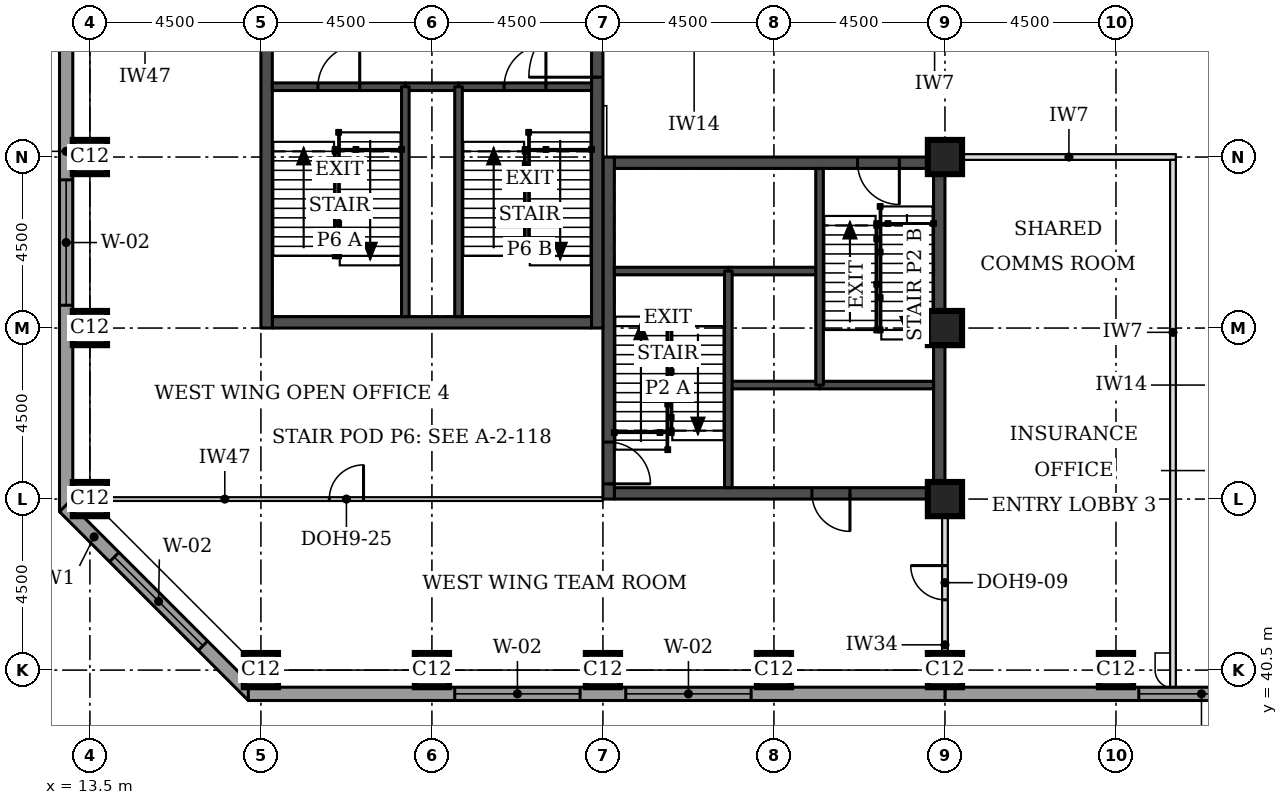
"""IFC4 building model, lengths in metres.
Left out: names, types, materials, properties, quantities, classifications, styles, units other than length and angle.
Written with IfcOpenShell. Run it as: python <this file> out.ifc"""

import sys

from ifc_helpers import new_model, si_unit, direction, frame, frame_2d, origin, origin_2d, place, context, subcontext, project, spatial, rectangle, extrude, element, fill, save


model = new_model("IFC4")
c1 = context("Model", 3, precision=1e-05, world=origin(), true_north=direction((0.0, 1.0)))
c2 = subcontext(c1, "Body", "Model", "MODEL_VIEW")
j1 = project(units=[si_unit("LENGTHUNIT", "METRE"), si_unit("PLANEANGLEUNIT", "RADIAN")], contexts=[c1])
p1 = place(None, origin())
s1 = spatial("IfcSite", under=j1, at=p1, CompositionType="ELEMENT")
p2 = place(p1, origin())
s2 = spatial("IfcBuilding", under=s1, at=p2, CompositionType="ELEMENT")
p3 = place(p2, frame((0.0, 0.0, 219.3)))
s3 = spatial("IfcBuildingStorey", under=s2, at=p3, CompositionType="ELEMENT", Elevation=219.3)
for number, where, z_axis, x_axis in (
    (1, (18.0, 40.5, 0.0), (0.0, 0.0, 1.0), (1.0, 0.0, 0.0)),
    (2, (22.5, 40.5, 0.0), (0.0, 0.0, 1.0), (1.0, 0.0, 0.0)),
    (3, (27.0, 40.5, 0.0), (0.0, 0.0, 1.0), (1.0, 0.0, 0.0)),
    (4, (31.5, 40.5, 0.0), (0.0, 0.0, 1.0), (1.0, 0.0, 0.0)),
    (5, (36.0, 40.5, 0.0), (0.0, 0.0, 1.0), (1.0, 0.0, 0.0)),
    (6, (40.5, 40.5, 0.0), (0.0, 0.0, 1.0), (1.0, 0.0, 0.0)),
    (7, (13.5, 45.0, 0.0), (0.0, 0.0, 1.0), (1.0, 0.0, 0.0)),
    (8, (36.0, 45.0, 0.0), (0.0, 0.0, 1.0), (1.0, 0.0, 0.0)),
    (9, (13.5, 49.5, 0.0), (0.0, 0.0, 1.0), (1.0, 0.0, 0.0)),
    (10, (36.0, 49.5, 0.0), (0.0, 0.0, 1.0), (1.0, 0.0, 0.0)),
    (11, (13.5, 54.0, 0.0), (0.0, 0.0, 1.0), (1.0, 0.0, 0.0)),
    (12, (36.0, 54.0, 0.0), (0.0, 0.0, 1.0), (1.0, 0.0, 0.0)),
):
    element("IfcColumn", number, at=place(p3, frame(where, z_axis=z_axis, x_axis=x_axis)), inside=s3, PredefinedType="COLUMN", context=c2, shape_type="SweptSolid", body=[
        extrude(rectangle(XDim=0.9, YDim=0.9, at=origin_2d()), origin(), (0.0, 0.0, 1.0), 3.7),
    ])
p4 = place(p3, frame((27.3, 45.15, 0.0), z_axis=(0.0, 0.0, 1.0), x_axis=(1.0, 0.0, 0.0)))
e13 = element("IfcWall", 13, at=p4, inside=s3, PredefinedType="SHEAR", context=c2, shape_type="SweptSolid", body=[
    extrude(rectangle(XDim=8.4, YDim=0.3, at=frame_2d((4.2, 0.0))), origin(), (0.0, 0.0, 1.0), 3.7),
])
p5 = place(p4, frame((5.2, 0.0, 0.0)))
e14 = element("IfcOpeningElement", 14, at=p5, cuts=e13, PredefinedType="OPENING", context=c2, shape_type="SweptSolid", body=[
    extrude(rectangle(XDim=1.0, YDim=2.1, at=frame_2d((0.5, 1.05))), frame((0.0, 0.16, 0.0), z_axis=(0.0, -1.0, 0.0), x_axis=(1.0, 0.0, 0.0)), (0.0, 0.0, 1.0), 0.32),
])
p6 = place(p3, frame((27.3, 53.85, 0.0), z_axis=(0.0, 0.0, 1.0), x_axis=(1.0, 0.0, 0.0)))
e15 = element("IfcWall", 15, at=p6, inside=s3, PredefinedType="SHEAR", context=c2, shape_type="SweptSolid", body=[
    extrude(rectangle(XDim=8.4, YDim=0.3, at=frame_2d((4.2, 0.0))), origin(), (0.0, 0.0, 1.0), 3.7),
])
p7 = place(p6, frame((6.4, 0.0, 0.0)))
e16 = element("IfcOpeningElement", 16, at=p7, cuts=e15, PredefinedType="OPENING", context=c2, shape_type="SweptSolid", body=[
    extrude(rectangle(XDim=1.1, YDim=2.1, at=frame_2d((0.55, 1.05))), frame((0.0, 0.16, 0.0), z_axis=(0.0, -1.0, 0.0), x_axis=(1.0, 0.0, 0.0)), (0.0, 0.0, 1.0), 0.32),
])
p8 = place(p3, frame((27.15, 45.0, 0.0), z_axis=(0.0, 0.0, 1.0), x_axis=(0.0, 1.0, 0.0)))
e17 = element("IfcWall", 17, at=p8, inside=s3, PredefinedType="SHEAR", context=c2, shape_type="SweptSolid", body=[
    extrude(rectangle(XDim=9.0, YDim=0.3, at=frame_2d((4.5, 0.0))), origin(), (0.0, 0.0, 1.0), 3.7),
])
p9 = place(p8, frame((0.4, 0.0, 0.0)))
e18 = element("IfcOpeningElement", 18, at=p9, cuts=e17, PredefinedType="OPENING", context=c2, shape_type="SweptSolid", body=[
    extrude(rectangle(XDim=1.1, YDim=2.1, at=frame_2d((0.55, 1.05))), frame((0.0, 0.16, 0.0), z_axis=(0.0, -1.0, 0.0), x_axis=(1.0, 0.0, 0.0)), (0.0, 0.0, 1.0), 0.32),
])
p10 = place(p3, frame((35.85, 45.0, 0.0), z_axis=(0.0, 0.0, 1.0), x_axis=(0.0, 1.0, 0.0)))
e19 = element("IfcWall", 19, at=p10, inside=s3, PredefinedType="SHEAR", context=c2, shape_type="SweptSolid", body=[
    extrude(rectangle(XDim=9.0, YDim=0.3, at=frame_2d((4.5, 0.0))), origin(), (0.0, 0.0, 1.0), 3.7),
])
p11 = place(p3, frame((18.3, 49.65, 0.0), z_axis=(0.0, 0.0, 1.0), x_axis=(1.0, 0.0, 0.0)))
e20 = element("IfcWall", 20, at=p11, inside=s3, PredefinedType="SHEAR", context=c2, shape_type="SweptSolid", body=[
    extrude(rectangle(XDim=8.4, YDim=0.3, at=frame_2d((4.2, 0.0))), origin(), (0.0, 0.0, 1.0), 3.7),
])
p12 = place(p3, frame((18.15, 49.5, 0.0), z_axis=(0.0, 0.0, 1.0), x_axis=(0.0, 1.0, 0.0)))
e21 = element("IfcWall", 21, at=p12, inside=s3, PredefinedType="SHEAR", context=c2, shape_type="SweptSolid", body=[
    extrude(rectangle(XDim=9.0, YDim=0.3, at=frame_2d((4.5, 0.0))), origin(), (0.0, 0.0, 1.0), 3.7),
])
p13 = place(p3, frame((26.85, 49.5, 0.0), z_axis=(0.0, 0.0, 1.0), x_axis=(0.0, 1.0, 0.0)))
e22 = element("IfcWall", 22, at=p13, inside=s3, PredefinedType="SHEAR", context=c2, shape_type="SweptSolid", body=[
    extrude(rectangle(XDim=9.0, YDim=0.3, at=frame_2d((4.5, 0.0))), origin(), (0.0, 0.0, 1.0), 3.7),
])
p14 = place(p13, frame((6.6, 0.0, 0.0)))
e23 = element("IfcOpeningElement", 23, at=p14, cuts=e22, PredefinedType="OPENING", context=c2, shape_type="SweptSolid", body=[
    extrude(rectangle(XDim=1.8, YDim=2.1, at=frame_2d((0.9, 1.05))), frame((0.0, 0.16, 0.0), z_axis=(0.0, -1.0, 0.0), x_axis=(1.0, 0.0, 0.0)), (0.0, 0.0, 1.0), 0.32),
])
p15 = place(p3, frame((36.0, 39.875, 0.0), z_axis=(0.0, 0.0, 1.0), x_axis=(1.0, 0.0, 0.0)))
e24 = element("IfcWall", 24, at=p15, inside=s3, PredefinedType="STANDARD", context=c2, shape_type="SweptSolid", body=[
    extrude(rectangle(XDim=36.331, YDim=0.35, at=frame_2d((18.166, 0.0))), origin(), (0.0, 0.0, 1.0), 3.525),
])
p16 = place(p15, frame((5.1, 0.0, 0.9)))
e25 = element("IfcOpeningElement", 25, at=p16, cuts=e24, PredefinedType="OPENING", context=c2, shape_type="SweptSolid", body=[
    extrude(rectangle(XDim=3.3, YDim=1.9, at=frame_2d((1.65, 0.95))), frame((0.0, 0.185, 0.0), z_axis=(0.0, -1.0, 0.0), x_axis=(1.0, 0.0, 0.0)), (0.0, 0.0, 1.0), 0.37),
])
p17 = place(p15, frame((9.6, 0.0, 0.9)))
e26 = element("IfcOpeningElement", 26, at=p17, cuts=e24, PredefinedType="OPENING", context=c2, shape_type="SweptSolid", body=[
    extrude(rectangle(XDim=3.3, YDim=1.9, at=frame_2d((1.65, 0.95))), frame((0.0, 0.185, 0.0), z_axis=(0.0, -1.0, 0.0), x_axis=(1.0, 0.0, 0.0)), (0.0, 0.0, 1.0), 0.37),
])
p18 = place(p15, frame((14.1, 0.0, 0.9)))
e27 = element("IfcOpeningElement", 27, at=p18, cuts=e24, PredefinedType="OPENING", context=c2, shape_type="SweptSolid", body=[
    extrude(rectangle(XDim=3.3, YDim=1.9, at=frame_2d((1.65, 0.95))), frame((0.0, 0.185, 0.0), z_axis=(0.0, -1.0, 0.0), x_axis=(1.0, 0.0, 0.0)), (0.0, 0.0, 1.0), 0.37),
])
p19 = place(p15, frame((18.6, 0.0, 0.9)))
e28 = element("IfcOpeningElement", 28, at=p19, cuts=e24, PredefinedType="OPENING", context=c2, shape_type="SweptSolid", body=[
    extrude(rectangle(XDim=3.3, YDim=1.9, at=frame_2d((1.65, 0.95))), frame((0.0, 0.185, 0.0), z_axis=(0.0, -1.0, 0.0), x_axis=(1.0, 0.0, 0.0)), (0.0, 0.0, 1.0), 0.37),
])
p20 = place(p15, frame((23.1, 0.0, 0.9)))
e29 = element("IfcOpeningElement", 29, at=p20, cuts=e24, PredefinedType="OPENING", context=c2, shape_type="SweptSolid", body=[
    extrude(rectangle(XDim=3.3, YDim=1.9, at=frame_2d((1.65, 0.95))), frame((0.0, 0.185, 0.0), z_axis=(0.0, -1.0, 0.0), x_axis=(1.0, 0.0, 0.0)), (0.0, 0.0, 1.0), 0.37),
])
p21 = place(p15, frame((27.6, 0.0, 0.9)))
e30 = element("IfcOpeningElement", 30, at=p21, cuts=e24, PredefinedType="OPENING", context=c2, shape_type="SweptSolid", body=[
    extrude(rectangle(XDim=3.3, YDim=1.9, at=frame_2d((1.65, 0.95))), frame((0.0, 0.185, 0.0), z_axis=(0.0, -1.0, 0.0), x_axis=(1.0, 0.0, 0.0)), (0.0, 0.0, 1.0), 0.37),
])
p22 = place(p3, frame((12.875, 58.831, 0.0), z_axis=(0.0, 0.0, 1.0), x_axis=(0.0, -1.0, 0.0)))
e31 = element("IfcWall", 31, at=p22, inside=s3, PredefinedType="STANDARD", context=c2, shape_type="SweptSolid", body=[
    extrude(rectangle(XDim=14.163, YDim=0.35, at=frame_2d((7.081, 0.0))), origin(), (0.0, 0.0, 1.0), 3.525),
])
p23 = place(p22, frame((5.431, 0.0, 0.9)))
e32 = element("IfcOpeningElement", 32, at=p23, cuts=e31, PredefinedType="OPENING", context=c2, shape_type="SweptSolid", body=[
    extrude(rectangle(XDim=3.3, YDim=1.9, at=frame_2d((1.65, 0.95))), frame((0.0, 0.185, 0.0), z_axis=(0.0, -1.0, 0.0), x_axis=(1.0, 0.0, 0.0)), (0.0, 0.0, 1.0), 0.37),
])
p24 = place(p3, frame((12.824, 44.792, 0.0), z_axis=(0.0, 0.0, 1.0), x_axis=(0.707106781187, -0.707106781187, 0.0)))
e33 = element("IfcWall", 33, at=p24, inside=s3, PredefinedType="STANDARD", context=c2, shape_type="SweptSolid", body=[
    extrude(rectangle(XDim=7.027, YDim=0.35, at=frame_2d((3.513, 0.0))), origin(), (0.0, 0.0, 1.0), 3.525),
])
p25 = place(p24, frame((1.863, 0.0, 0.9)))
e34 = element("IfcOpeningElement", 34, at=p25, cuts=e33, PredefinedType="OPENING", context=c2, shape_type="SweptSolid", body=[
    extrude(rectangle(XDim=3.3, YDim=1.9, at=frame_2d((1.65, 0.95))), frame((0.0, 0.185, 0.0), z_axis=(0.0, -1.0, 0.0), x_axis=(1.0, 0.0, 0.0)), (0.0, 0.0, 1.0), 0.37),
])
p26 = place(p3, frame((17.669, 39.875, 0.0), z_axis=(0.0, 0.0, 1.0), x_axis=(1.0, 0.0, 0.0)))
e35 = element("IfcWall", 35, at=p26, inside=s3, PredefinedType="STANDARD", context=c2, shape_type="SweptSolid", body=[
    extrude(rectangle(XDim=18.331, YDim=0.35, at=frame_2d((9.166, 0.0))), origin(), (0.0, 0.0, 1.0), 3.525),
])
p27 = place(p26, frame((5.431, 0.0, 0.9)))
e36 = element("IfcOpeningElement", 36, at=p27, cuts=e35, PredefinedType="OPENING", context=c2, shape_type="SweptSolid", body=[
    extrude(rectangle(XDim=3.3, YDim=1.9, at=frame_2d((1.65, 0.95))), frame((0.0, 0.185, 0.0), z_axis=(0.0, -1.0, 0.0), x_axis=(1.0, 0.0, 0.0)), (0.0, 0.0, 1.0), 0.37),
])
p28 = place(p26, frame((9.931, 0.0, 0.9)))
e37 = element("IfcOpeningElement", 37, at=p28, cuts=e35, PredefinedType="OPENING", context=c2, shape_type="SweptSolid", body=[
    extrude(rectangle(XDim=3.3, YDim=1.9, at=frame_2d((1.65, 0.95))), frame((0.0, 0.185, 0.0), z_axis=(0.0, -1.0, 0.0), x_axis=(1.0, 0.0, 0.0)), (0.0, 0.0, 1.0), 0.37),
])
p29 = place(p3, frame((36.45, 54.0, 0.0), z_axis=(0.0, 0.0, 1.0), x_axis=(1.0, 0.0, 0.0)))
e38 = element("IfcWall", 38, at=p29, inside=s3, PredefinedType="PARTITIONING", context=c2, shape_type="SweptSolid", body=[
    extrude(rectangle(XDim=5.625, YDim=0.15, at=frame_2d((2.812, 0.0))), origin(), (0.0, 0.0, 1.0), 3.55),
])
p30 = place(p3, frame((42.0, 40.05, 0.0), z_axis=(0.0, 0.0, 1.0), x_axis=(0.0, 1.0, 0.0)))
e39 = element("IfcWall", 39, at=p30, inside=s3, PredefinedType="PARTITIONING", context=c2, shape_type="SweptSolid", body=[
    extrude(rectangle(XDim=13.875, YDim=0.15, at=frame_2d((6.938, 0.0))), origin(), (0.0, 0.0, 1.0), 3.55),
])
p31 = place(p3, frame((36.0, 40.95, 0.0), z_axis=(0.0, 0.0, 1.0), x_axis=(0.0, 1.0, 0.0)))
e40 = element("IfcWall", 40, at=p31, inside=s3, PredefinedType="PARTITIONING", context=c2, shape_type="SweptSolid", body=[
    extrude(rectangle(XDim=3.63, YDim=0.15, at=frame_2d((1.815, 0.0))), origin(), (0.0, 0.0, 1.0), 2.8),
])
p32 = place(p31, frame((1.4, 0.0, 0.0)))
e41 = element("IfcOpeningElement", 41, at=p32, cuts=e40, PredefinedType="OPENING", context=c2, shape_type="SweptSolid", body=[
    extrude(rectangle(XDim=0.9, YDim=2.1, at=frame_2d((0.45, 1.05))), frame((0.0, 0.085, 0.0), z_axis=(0.0, -1.0, 0.0), x_axis=(1.0, 0.0, 0.0)), (0.0, 0.0, 1.0), 0.17),
])
p33 = place(p3, frame((13.5, 45.0, 0.0), z_axis=(0.0, 0.0, 1.0), x_axis=(1.0, 0.0, 0.0)))
e42 = element("IfcWall", 42, at=p33, inside=s3, PredefinedType="PARTITIONING", context=c2, shape_type="SweptSolid", body=[
    extrude(rectangle(XDim=13.5, YDim=0.1, at=frame_2d((6.75, 0.0))), origin(), (0.0, 0.0, 1.0), 2.55),
])
p34 = place(p33, frame((6.3, 0.0, 0.0)))
e43 = element("IfcOpeningElement", 43, at=p34, cuts=e42, PredefinedType="OPENING", context=c2, shape_type="SweptSolid", body=[
    extrude(rectangle(XDim=0.9, YDim=2.1, at=frame_2d((0.45, 1.05))), frame((0.0, 0.06, 0.0), z_axis=(0.0, -1.0, 0.0), x_axis=(1.0, 0.0, 0.0)), (0.0, 0.0, 1.0), 0.12),
])
p35 = place(p3, frame((30.3, 48.0, 0.0), z_axis=(0.0, 0.0, 1.0), x_axis=(1.0, 0.0, 0.0)))
e44 = element("IfcWall", 44, at=p35, inside=s3, PredefinedType="SOLIDWALL", context=c2, shape_type="SweptSolid", body=[
    extrude(rectangle(XDim=2.4, YDim=0.2, at=frame_2d((1.2, 0.0))), origin(), (0.0, 0.0, 1.0), 3.55),
])
p36 = place(p3, frame((32.7, 48.0, 0.0), z_axis=(0.0, 0.0, 1.0), x_axis=(1.0, 0.0, 0.0)))
e45 = element("IfcWall", 45, at=p36, inside=s3, PredefinedType="SOLIDWALL", context=c2, shape_type="SweptSolid", body=[
    extrude(rectangle(XDim=3.0, YDim=0.2, at=frame_2d((1.5, 0.0))), origin(), (0.0, 0.0, 1.0), 3.55),
])
p37 = place(p3, frame((30.3, 51.0, 0.0), z_axis=(0.0, 0.0, 1.0), x_axis=(1.0, 0.0, 0.0)))
e46 = element("IfcWall", 46, at=p37, inside=s3, PredefinedType="SOLIDWALL", context=c2, shape_type="SweptSolid", body=[
    extrude(rectangle(XDim=2.4, YDim=0.2, at=frame_2d((1.2, 0.0))), origin(), (0.0, 0.0, 1.0), 3.7),
])
p38 = place(p3, frame((27.3, 51.0, 0.0), z_axis=(0.0, 0.0, 1.0), x_axis=(1.0, 0.0, 0.0)))
e47 = element("IfcWall", 47, at=p38, inside=s3, PredefinedType="SOLIDWALL", context=c2, shape_type="SweptSolid", body=[
    extrude(rectangle(XDim=3.0, YDim=0.2, at=frame_2d((1.5, 0.0))), origin(), (0.0, 0.0, 1.0), 3.55),
])
for number, where, z_axis, x_axis in (
    (48, (30.3, 45.3, 0.0), (0.0, 0.0, 1.0), (0.0, 1.0, 0.0)),
    (49, (32.7, 48.0, 0.0), (0.0, 0.0, 1.0), (0.0, 1.0, 0.0)),
):
    element("IfcWall", number, at=place(p3, frame(where, z_axis=z_axis, x_axis=x_axis)), inside=s3, PredefinedType="SOLIDWALL", context=c2, shape_type="SweptSolid", body=[
        extrude(rectangle(XDim=5.7, YDim=0.2, at=frame_2d((2.85, 0.0))), origin(), (0.0, 0.0, 1.0), 3.55),
    ])
p39 = place(p3, frame((21.8, 55.85, 0.0), z_axis=(0.0, 0.0, 1.0), x_axis=(1.0, 0.0, 0.0)))
e50 = element("IfcWall", 50, at=p39, inside=s3, PredefinedType="SOLIDWALL", context=c2, shape_type="SweptSolid", body=[
    extrude(rectangle(XDim=1.4, YDim=0.2, at=frame_2d((0.7, 0.0))), origin(), (0.0, 0.0, 1.0), 3.55),
])
p40 = place(p3, frame((18.3, 55.85, 0.0), z_axis=(0.0, 0.0, 1.0), x_axis=(1.0, 0.0, 0.0)))
e51 = element("IfcWall", 51, at=p40, inside=s3, PredefinedType="SOLIDWALL", context=c2, shape_type="SweptSolid", body=[
    extrude(rectangle(XDim=3.5, YDim=0.2, at=frame_2d((1.75, 0.0))), origin(), (0.0, 0.0, 1.0), 3.55),
])
p41 = place(p40, frame((1.2, 0.0, 0.0)))
e52 = element("IfcOpeningElement", 52, at=p41, cuts=e51, PredefinedType="OPENING", context=c2, shape_type="SweptSolid", body=[
    extrude(rectangle(XDim=1.1, YDim=2.1, at=frame_2d((0.55, 1.05))), frame((0.0, 0.11, 0.0), z_axis=(0.0, -1.0, 0.0), x_axis=(1.0, 0.0, 0.0)), (0.0, 0.0, 1.0), 0.22),
])
p42 = place(p3, frame((23.2, 55.85, 0.0), z_axis=(0.0, 0.0, 1.0), x_axis=(1.0, 0.0, 0.0)))
e53 = element("IfcWall", 53, at=p42, inside=s3, PredefinedType="SOLIDWALL", context=c2, shape_type="SweptSolid", body=[
    extrude(rectangle(XDim=3.5, YDim=0.2, at=frame_2d((1.75, 0.0))), origin(), (0.0, 0.0, 1.0), 3.55),
])
p43 = place(p42, frame((1.2, 0.0, 0.0)))
e54 = element("IfcOpeningElement", 54, at=p43, cuts=e53, PredefinedType="OPENING", context=c2, shape_type="SweptSolid", body=[
    extrude(rectangle(XDim=1.1, YDim=2.1, at=frame_2d((0.55, 1.05))), frame((0.0, 0.11, 0.0), z_axis=(0.0, -1.0, 0.0), x_axis=(1.0, 0.0, 0.0)), (0.0, 0.0, 1.0), 0.22),
])
for number, where, z_axis, x_axis in (
    (55, (21.8, 49.8, 0.0), (0.0, 0.0, 1.0), (0.0, 1.0, 0.0)),
    (56, (23.2, 49.8, 0.0), (0.0, 0.0, 1.0), (0.0, 1.0, 0.0)),
):
    element("IfcWall", number, at=place(p3, frame(where, z_axis=z_axis, x_axis=x_axis)), inside=s3, PredefinedType="SOLIDWALL", context=c2, shape_type="SweptSolid", body=[
        extrude(rectangle(XDim=6.05, YDim=0.2, at=frame_2d((3.025, 0.0))), origin(), (0.0, 0.0, 1.0), 3.55),
    ])
p44 = place(p16, origin())
e57 = element("IfcWindow", 57, at=p44, inside=s3, PartitioningType="SINGLE_PANEL", PredefinedType="WINDOW", context=c2, shape_type="SweptSolid", body=[
    extrude(rectangle(XDim=3.3, YDim=1.9, at=frame_2d((1.65, 0.95))), frame((0.0, 0.085, 0.0), z_axis=(0.0, -1.0, 0.0), x_axis=(1.0, 0.0, 0.0)), (0.0, 0.0, 1.0), 0.06),
])
fill(e25, e57)
p45 = place(p23, origin())
e58 = element("IfcWindow", 58, at=p45, inside=s3, PartitioningType="SINGLE_PANEL", PredefinedType="WINDOW", context=c2, shape_type="SweptSolid", body=[
    extrude(rectangle(XDim=3.3, YDim=1.9, at=frame_2d((1.65, 0.95))), frame((0.0, 0.085, 0.0), z_axis=(0.0, -1.0, 0.0), x_axis=(1.0, 0.0, 0.0)), (0.0, 0.0, 1.0), 0.06),
])
fill(e32, e58)
p46 = place(p25, origin())
e59 = element("IfcWindow", 59, at=p46, inside=s3, PartitioningType="SINGLE_PANEL", PredefinedType="WINDOW", context=c2, shape_type="SweptSolid", body=[
    extrude(rectangle(XDim=3.3, YDim=1.9, at=frame_2d((1.65, 0.95))), frame((0.0, 0.085, 0.0), z_axis=(0.0, -1.0, 0.0), x_axis=(1.0, 0.0, 0.0)), (0.0, 0.0, 1.0), 0.06),
])
fill(e34, e59)
p47 = place(p27, origin())
e60 = element("IfcWindow", 60, at=p47, inside=s3, PartitioningType="SINGLE_PANEL", PredefinedType="WINDOW", context=c2, shape_type="SweptSolid", body=[
    extrude(rectangle(XDim=3.3, YDim=1.9, at=frame_2d((1.65, 0.95))), frame((0.0, 0.085, 0.0), z_axis=(0.0, -1.0, 0.0), x_axis=(1.0, 0.0, 0.0)), (0.0, 0.0, 1.0), 0.06),
])
fill(e36, e60)
p48 = place(p28, origin())
e61 = element("IfcWindow", 61, at=p48, inside=s3, PartitioningType="SINGLE_PANEL", PredefinedType="WINDOW", context=c2, shape_type="SweptSolid", body=[
    extrude(rectangle(XDim=3.3, YDim=1.9, at=frame_2d((1.65, 0.95))), frame((0.0, 0.085, 0.0), z_axis=(0.0, -1.0, 0.0), x_axis=(1.0, 0.0, 0.0)), (0.0, 0.0, 1.0), 0.06),
])
fill(e37, e61)
p49 = place(p32, origin())
e62 = element("IfcDoor", 62, at=p49, inside=s3, OperationType="SINGLE_SWING_RIGHT", PredefinedType="DOOR", context=c2, shape_type="SweptSolid", body=[
    extrude(rectangle(XDim=0.9, YDim=2.1, at=frame_2d((0.45, 1.05))), frame((0.0, 0.025, 0.0), z_axis=(0.0, -1.0, 0.0), x_axis=(1.0, 0.0, 0.0)), (0.0, 0.0, 1.0), 0.05),
])
fill(e41, e62)
p50 = place(p34, origin())
e63 = element("IfcDoor", 63, at=p50, inside=s3, OperationType="SINGLE_SWING_RIGHT", PredefinedType="DOOR", context=c2, shape_type="SweptSolid", body=[
    extrude(rectangle(XDim=0.9, YDim=2.1, at=frame_2d((0.45, 1.05))), frame((0.0, 0.025, 0.0), z_axis=(0.0, -1.0, 0.0), x_axis=(1.0, 0.0, 0.0)), (0.0, 0.0, 1.0), 0.05),
])
fill(e43, e63)
p51 = place(p9, frame((1.1, 0.0, 0.0), z_axis=(0.0, 0.0, 1.0), x_axis=(-1.0, 0.0, 0.0)))
e64 = element("IfcDoor", 64, at=p51, inside=s3, OperationType="SINGLE_SWING_RIGHT", PredefinedType="DOOR", context=c2, shape_type="SweptSolid", body=[
    extrude(rectangle(XDim=1.1, YDim=2.1, at=frame_2d((0.55, 1.05))), frame((0.0, 0.025, 0.0), z_axis=(0.0, -1.0, 0.0), x_axis=(1.0, 0.0, 0.0)), (0.0, 0.0, 1.0), 0.05),
])
fill(e18, e64)
p52 = place(p7, frame((1.1, 0.0, 0.0), z_axis=(0.0, 0.0, 1.0), x_axis=(-1.0, 0.0, 0.0)))
e65 = element("IfcDoor", 65, at=p52, inside=s3, OperationType="SINGLE_SWING_LEFT", PredefinedType="DOOR", context=c2, shape_type="SweptSolid", body=[
    extrude(rectangle(XDim=1.1, YDim=2.1, at=frame_2d((0.55, 1.05))), frame((0.0, 0.025, 0.0), z_axis=(0.0, -1.0, 0.0), x_axis=(1.0, 0.0, 0.0)), (0.0, 0.0, 1.0), 0.05),
])
fill(e16, e65)
p53 = place(p5, frame((1.0, 0.0, 0.0), z_axis=(0.0, 0.0, 1.0), x_axis=(-1.0, 0.0, 0.0)))
e66 = element("IfcDoor", 66, at=p53, inside=s3, OperationType="SINGLE_SWING_LEFT", PredefinedType="DOOR", context=c2, shape_type="SweptSolid", body=[
    extrude(rectangle(XDim=1.0, YDim=2.1, at=frame_2d((0.5, 1.05))), frame((0.0, 0.025, 0.0), z_axis=(0.0, -1.0, 0.0), x_axis=(1.0, 0.0, 0.0)), (0.0, 0.0, 1.0), 0.05),
])
fill(e14, e66)
p54 = place(p41, origin())
e67 = element("IfcDoor", 67, at=p54, inside=s3, OperationType="SINGLE_SWING_RIGHT", PredefinedType="DOOR", context=c2, shape_type="SweptSolid", body=[
    extrude(rectangle(XDim=1.1, YDim=2.1, at=frame_2d((0.55, 1.05))), frame((0.0, 0.025, 0.0), z_axis=(0.0, -1.0, 0.0), x_axis=(1.0, 0.0, 0.0)), (0.0, 0.0, 1.0), 0.05),
])
fill(e52, e67)
p55 = place(p43, origin())
e68 = element("IfcDoor", 68, at=p55, inside=s3, OperationType="SINGLE_SWING_RIGHT", PredefinedType="DOOR", context=c2, shape_type="SweptSolid", body=[
    extrude(rectangle(XDim=1.1, YDim=2.1, at=frame_2d((0.55, 1.05))), frame((0.0, 0.025, 0.0), z_axis=(0.0, -1.0, 0.0), x_axis=(1.0, 0.0, 0.0)), (0.0, 0.0, 1.0), 0.05),
])
fill(e54, e68)
p56 = place(p14, origin())
e69 = element("IfcDoor", 69, at=p56, inside=s3, OperationType="SINGLE_SWING_LEFT", PredefinedType="DOOR", context=c2, shape_type="SweptSolid", body=[
    extrude(rectangle(XDim=1.8, YDim=2.1, at=frame_2d((0.9, 1.05))), frame((0.0, 0.025, 0.0), z_axis=(0.0, -1.0, 0.0), x_axis=(1.0, 0.0, 0.0)), (0.0, 0.0, 1.0), 0.05),
])
fill(e23, e69)
save(model, sys.argv[1])
